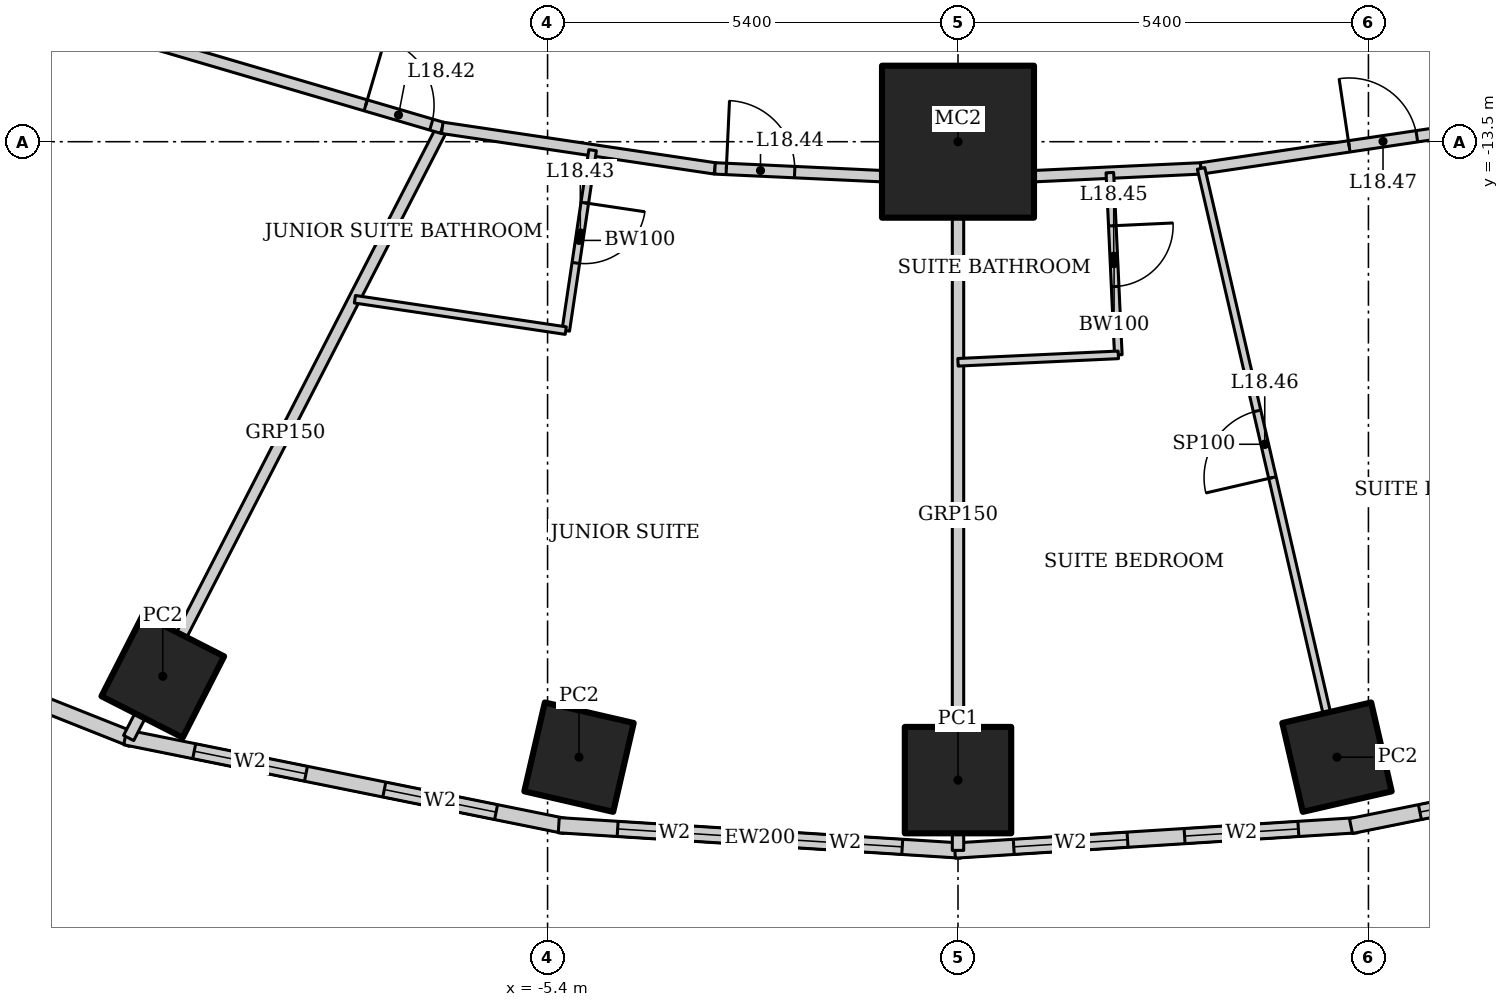
"""IFC4 building model, lengths in metres.
Left out: names, types, materials, properties, quantities, classifications, styles, units other than length and angle.
Written with IfcOpenShell. Run it as: python <this file> out.ifc"""

import sys

from ifc_helpers import new_model, si_unit, direction, frame, frame_2d, origin, origin_2d, place, context, subcontext, project, spatial, rectangle, hollow_rectangle, extrude, element, fill, save


model = new_model("IFC4")
c1 = context("Model", 3, precision=1e-05, world=origin(), true_north=direction((0.0, 1.0)))
c2 = subcontext(c1, "Body", "Model", "MODEL_VIEW")
j1 = project(units=[si_unit("LENGTHUNIT", "METRE"), si_unit("PLANEANGLEUNIT", "RADIAN")], contexts=[c1])
p1 = place(None, origin())
s1 = spatial("IfcSite", under=j1, at=p1, CompositionType="ELEMENT")
p2 = place(p1, origin())
s2 = spatial("IfcBuilding", under=s1, at=p2, CompositionType="ELEMENT")
p3 = place(p2, frame((0.0, 0.0, 80.2)))
s3 = spatial("IfcBuildingStorey", under=s2, at=p3, CompositionType="ELEMENT", Elevation=80.2)
p4 = place(p3, frame((0.0, -13.5, 0.0), z_axis=(0.0, 0.0, 1.0), x_axis=(1.0, 0.0, 0.0)))
e1 = element("IfcColumn", 1, at=p4, inside=s3, PredefinedType="COLUMN", context=c2, shape_type="SweptSolid", body=[
    extrude(hollow_rectangle(XDim=2.0, YDim=2.0, WallThickness=0.17, at=origin_2d()), origin(), (0.0, 0.0, 1.0), 3.6),
])
for number, where, z_axis, x_axis in (
    (2, (-10.463, -20.534, 0.0), (0.0, 0.0, 1.0), (0.454, 0.891, 0.0)),
    (3, (-4.986, -21.598, 0.0), (0.0, 0.0, 1.0), (0.225, 0.974, 0.0)),
):
    element("IfcColumn", number, at=place(p3, frame(where, z_axis=z_axis, x_axis=x_axis)), inside=s3, PredefinedType="COLUMN", context=c2, shape_type="SweptSolid", body=[
        extrude(hollow_rectangle(XDim=1.2, YDim=1.2, WallThickness=0.1, at=origin_2d()), origin(), (0.0, 0.0, 1.0), 3.6),
    ])
p5 = place(p3, frame((0.0, -21.9, 0.0), z_axis=(0.0, 0.0, 1.0), x_axis=(1.0, 0.0, 0.0)))
e4 = element("IfcColumn", 4, at=p5, inside=s3, PredefinedType="COLUMN", context=c2, shape_type="SweptSolid", body=[
    extrude(hollow_rectangle(XDim=1.4, YDim=1.4, WallThickness=0.1, at=origin_2d()), origin(), (0.0, 0.0, 1.0), 3.6),
])
p6 = place(p3, frame((4.986, -21.598, 0.0), z_axis=(0.0, 0.0, 1.0), x_axis=(0.974370064785, 0.224951054344, 0.0)))
e5 = element("IfcColumn", 5, at=p6, inside=s3, PredefinedType="COLUMN", context=c2, shape_type="SweptSolid", body=[
    extrude(hollow_rectangle(XDim=1.2, YDim=1.2, WallThickness=0.1, at=origin_2d()), origin(), (0.0, 0.0, 1.0), 3.6),
])
p7 = place(p3, frame((-18.018, -18.523, 0.0), z_axis=(0.0, 0.0, 1.0), x_axis=(0.929358351251, -0.369178892895, 0.0)))
e6 = element("IfcWall", 6, at=p7, inside=s3, PredefinedType="SOLIDWALL", context=c2, shape_type="SweptSolid", body=[
    extrude(rectangle(XDim=7.692, YDim=0.2, at=frame_2d((3.846, 0.0))), origin(), (0.0, 0.0, 1.0), 3.45),
])
p8 = place(p7, frame((1.373, 0.0, 0.5)))
e7 = element("IfcOpeningElement", 7, at=p8, cuts=e6, PredefinedType="OPENING", context=c2, shape_type="SweptSolid", body=[
    extrude(rectangle(XDim=1.5, YDim=2.2, at=frame_2d((0.75, 1.1))), frame((0.0, 0.11, 0.0), z_axis=(0.0, -1.0, 0.0), x_axis=(1.0, 0.0, 0.0)), (0.0, 0.0, 1.0), 0.22),
])
p9 = place(p7, frame((4.819, 0.0, 0.5)))
e8 = element("IfcOpeningElement", 8, at=p9, cuts=e6, PredefinedType="OPENING", context=c2, shape_type="SweptSolid", body=[
    extrude(rectangle(XDim=1.5, YDim=2.2, at=frame_2d((0.75, 1.1))), frame((0.0, 0.11, 0.0), z_axis=(0.0, -1.0, 0.0), x_axis=(1.0, 0.0, 0.0)), (0.0, 0.0, 1.0), 0.22),
])
p10 = place(p3, frame((-10.957, -21.337, 0.0), z_axis=(0.0, 0.0, 1.0), x_axis=(0.980251657452, -0.197754110105, 0.0)))
e9 = element("IfcWall", 9, at=p10, inside=s3, PredefinedType="SOLIDWALL", context=c2, shape_type="SweptSolid", body=[
    extrude(rectangle(XDim=5.904, YDim=0.2, at=frame_2d((2.952, 0.0))), origin(), (0.0, 0.0, 1.0), 3.45),
])
p11 = place(p10, frame((0.926, 0.0, 0.5)))
e10 = element("IfcOpeningElement", 10, at=p11, cuts=e9, PredefinedType="OPENING", context=c2, shape_type="SweptSolid", body=[
    extrude(rectangle(XDim=1.5, YDim=2.2, at=frame_2d((0.75, 1.1))), frame((0.0, 0.11, 0.0), z_axis=(0.0, -1.0, 0.0), x_axis=(1.0, 0.0, 0.0)), (0.0, 0.0, 1.0), 0.22),
])
p12 = place(p10, frame((3.478, 0.0, 0.5)))
e11 = element("IfcOpeningElement", 11, at=p12, cuts=e9, PredefinedType="OPENING", context=c2, shape_type="SweptSolid", body=[
    extrude(rectangle(XDim=1.5, YDim=2.2, at=frame_2d((0.75, 1.1))), frame((0.0, 0.11, 0.0), z_axis=(0.0, -1.0, 0.0), x_axis=(1.0, 0.0, 0.0)), (0.0, 0.0, 1.0), 0.22),
])
p13 = place(p3, frame((-5.253, -22.493, 0.0), z_axis=(0.0, 0.0, 1.0), x_axis=(0.998018582375, -0.062919863585, 0.0)))
e12 = element("IfcWall", 12, at=p13, inside=s3, PredefinedType="SOLIDWALL", context=c2, shape_type="SweptSolid", body=[
    extrude(rectangle(XDim=5.304, YDim=0.2, at=frame_2d((2.652, 0.0))), origin(), (0.0, 0.0, 1.0), 3.45),
])
p14 = place(p13, frame((0.776, 0.0, 0.5)))
e13 = element("IfcOpeningElement", 13, at=p14, cuts=e12, PredefinedType="OPENING", context=c2, shape_type="SweptSolid", body=[
    extrude(rectangle(XDim=1.5, YDim=2.2, at=frame_2d((0.75, 1.1))), frame((0.0, 0.11, 0.0), z_axis=(0.0, -1.0, 0.0), x_axis=(1.0, 0.0, 0.0)), (0.0, 0.0, 1.0), 0.22),
])
p15 = place(p13, frame((3.028, 0.0, 0.5)))
e14 = element("IfcOpeningElement", 14, at=p15, cuts=e12, PredefinedType="OPENING", context=c2, shape_type="SweptSolid", body=[
    extrude(rectangle(XDim=1.5, YDim=2.2, at=frame_2d((0.75, 1.1))), frame((0.0, 0.11, 0.0), z_axis=(0.0, -1.0, 0.0), x_axis=(1.0, 0.0, 0.0)), (0.0, 0.0, 1.0), 0.22),
])
p16 = place(p3, frame((-0.041, -22.827, 0.0), z_axis=(0.0, 0.0, 1.0), x_axis=(0.998018582375, 0.062919863585, 0.0)))
e15 = element("IfcWall", 15, at=p16, inside=s3, PredefinedType="SOLIDWALL", context=c2, shape_type="SweptSolid", body=[
    extrude(rectangle(XDim=5.304, YDim=0.2, at=frame_2d((2.652, 0.0))), origin(), (0.0, 0.0, 1.0), 3.45),
])
p17 = place(p16, frame((0.776, 0.0, 0.5)))
e16 = element("IfcOpeningElement", 16, at=p17, cuts=e15, PredefinedType="OPENING", context=c2, shape_type="SweptSolid", body=[
    extrude(rectangle(XDim=1.5, YDim=2.2, at=frame_2d((0.75, 1.1))), frame((0.0, 0.11, 0.0), z_axis=(0.0, -1.0, 0.0), x_axis=(1.0, 0.0, 0.0)), (0.0, 0.0, 1.0), 0.22),
])
p18 = place(p16, frame((3.028, 0.0, 0.5)))
e17 = element("IfcOpeningElement", 17, at=p18, cuts=e15, PredefinedType="OPENING", context=c2, shape_type="SweptSolid", body=[
    extrude(rectangle(XDim=1.5, YDim=2.2, at=frame_2d((0.75, 1.1))), frame((0.0, 0.11, 0.0), z_axis=(0.0, -1.0, 0.0), x_axis=(1.0, 0.0, 0.0)), (0.0, 0.0, 1.0), 0.22),
])
p19 = place(p3, frame((5.17, -22.504, 0.0), z_axis=(0.0, 0.0, 1.0), x_axis=(0.980251657452, 0.197754110105, 0.0)))
e18 = element("IfcWall", 18, at=p19, inside=s3, PredefinedType="SOLIDWALL", context=c2, shape_type="SweptSolid", body=[
    extrude(rectangle(XDim=5.904, YDim=0.2, at=frame_2d((2.952, 0.0))), origin(), (0.0, 0.0, 1.0), 3.45),
])
p20 = place(p19, frame((0.926, 0.0, 0.5)))
e19 = element("IfcOpeningElement", 19, at=p20, cuts=e18, PredefinedType="OPENING", context=c2, shape_type="SweptSolid", body=[
    extrude(rectangle(XDim=1.5, YDim=2.2, at=frame_2d((0.75, 1.1))), frame((0.0, 0.11, 0.0), z_axis=(0.0, -1.0, 0.0), x_axis=(1.0, 0.0, 0.0)), (0.0, 0.0, 1.0), 0.22),
])
p21 = place(p19, frame((3.478, 0.0, 0.5)))
e20 = element("IfcOpeningElement", 20, at=p21, cuts=e18, PredefinedType="OPENING", context=c2, shape_type="SweptSolid", body=[
    extrude(rectangle(XDim=1.5, YDim=2.2, at=frame_2d((0.75, 1.1))), frame((0.0, 0.11, 0.0), z_axis=(0.0, -1.0, 0.0), x_axis=(1.0, 0.0, 0.0)), (0.0, 0.0, 1.0), 0.22),
])
p22 = place(p3, frame((-10.912, -21.346, 0.0), z_axis=(0.0, 0.0, 1.0), x_axis=(0.457117602022, 0.889406261458, 0.0)))
e21 = element("IfcWall", 21, at=p22, inside=s3, PredefinedType="PARTITIONING", context=c2, shape_type="SweptSolid", body=[
    extrude(rectangle(XDim=9.027, YDim=0.15, at=frame_2d((4.513, 0.0))), origin(), (0.0, 0.0, 1.0), 2.528),
])
p23 = place(p3, frame((0.0, -22.825, 0.0), z_axis=(0.0, 0.0, 1.0), x_axis=(0.0, 1.0, 0.0)))
e22 = element("IfcWall", 22, at=p23, inside=s3, PredefinedType="PARTITIONING", context=c2, shape_type="SweptSolid", body=[
    extrude(rectangle(XDim=8.825, YDim=0.15, at=frame_2d((4.412, 0.0))), origin(), (0.0, 0.0, 1.0), 2.924),
])
p24 = place(p3, frame((-11.519, -11.928, 0.0), z_axis=(0.0, 0.0, 1.0), x_axis=(0.959496227294, -0.281721475589, 0.0)))
e23 = element("IfcWall", 23, at=p24, inside=s3, PredefinedType="PARTITIONING", context=c2, shape_type="SweptSolid", body=[
    extrude(rectangle(XDim=4.933, YDim=0.15, at=frame_2d((2.466, 0.0))), origin(), (0.0, 0.0, 1.0), 3.45),
])
p25 = place(p24, frame((3.883, 0.0, 0.0)))
e24 = element("IfcOpeningElement", 24, at=p25, cuts=e23, PredefinedType="OPENING", context=c2, shape_type="SweptSolid", body=[
    extrude(rectangle(XDim=0.9, YDim=2.1, at=frame_2d((0.45, 1.05))), frame((0.0, 0.085, 0.0), z_axis=(0.0, -1.0, 0.0), x_axis=(1.0, 0.0, 0.0)), (0.0, 0.0, 1.0), 0.17),
])
p26 = place(p3, frame((-6.786, -13.317, 0.0), z_axis=(0.0, 0.0, 1.0), x_axis=(0.989107488999, -0.14719502439, 0.0)))
e25 = element("IfcWall", 25, at=p26, inside=s3, PredefinedType="PARTITIONING", context=c2, shape_type="SweptSolid", body=[
    extrude(rectangle(XDim=3.627, YDim=0.15, at=frame_2d((1.814, 0.0))), origin(), (0.0, 0.0, 1.0), 3.45),
])
p27 = place(p3, frame((-3.198, -13.851, 0.0), z_axis=(0.0, 0.0, 1.0), x_axis=(0.998920826789, -0.046445471333, 0.0)))
e26 = element("IfcWall", 26, at=p27, inside=s3, PredefinedType="PARTITIONING", context=c2, shape_type="SweptSolid", body=[
    extrude(rectangle(XDim=3.201, YDim=0.15, at=frame_2d((1.601, 0.0))), origin(), (0.0, 0.0, 1.0), 3.45),
])
p28 = place(p27, frame((0.15, 0.0, 0.0)))
e27 = element("IfcOpeningElement", 27, at=p28, cuts=e26, PredefinedType="OPENING", context=c2, shape_type="SweptSolid", body=[
    extrude(rectangle(XDim=0.9, YDim=2.1, at=frame_2d((0.45, 1.05))), frame((0.0, 0.085, 0.0), z_axis=(0.0, -1.0, 0.0), x_axis=(1.0, 0.0, 0.0)), (0.0, 0.0, 1.0), 0.17),
])
p29 = place(p3, frame((0.0, -14.0, 0.0), z_axis=(0.0, 0.0, 1.0), x_axis=(0.998920826789, 0.046445471333, 0.0)))
e28 = element("IfcWall", 28, at=p29, inside=s3, PredefinedType="PARTITIONING", context=c2, shape_type="SweptSolid", body=[
    extrude(rectangle(XDim=3.201, YDim=0.15, at=frame_2d((1.601, 0.0))), origin(), (0.0, 0.0, 1.0), 3.45),
])
p30 = place(p3, frame((3.198, -13.851, 0.0), z_axis=(0.0, 0.0, 1.0), x_axis=(0.989107488999, 0.14719502439, 0.0)))
e29 = element("IfcWall", 29, at=p30, inside=s3, PredefinedType="PARTITIONING", context=c2, shape_type="SweptSolid", body=[
    extrude(rectangle(XDim=3.627, YDim=0.15, at=frame_2d((1.814, 0.0))), origin(), (0.0, 0.0, 1.0), 3.45),
])
p31 = place(p30, frame((1.97, 0.0, 0.0)))
e30 = element("IfcOpeningElement", 30, at=p31, cuts=e29, PredefinedType="OPENING", context=c2, shape_type="SweptSolid", body=[
    extrude(rectangle(XDim=0.9, YDim=2.1, at=frame_2d((0.45, 1.05))), frame((0.0, 0.085, 0.0), z_axis=(0.0, -1.0, 0.0), x_axis=(1.0, 0.0, 0.0)), (0.0, 0.0, 1.0), 0.17),
])
p32 = place(p3, frame((-4.807, -13.612, 0.0), z_axis=(0.0, 0.0, 1.0), x_axis=(-0.147201193874, -0.989106570862, 0.0)))
e31 = element("IfcWall", 31, at=p32, inside=s3, PredefinedType="PARTITIONING", context=c2, shape_type="SweptSolid", body=[
    extrude(rectangle(XDim=2.4, YDim=0.1, at=frame_2d((1.2, 0.0))), origin(), (0.0, 0.0, 1.0), 3.45),
])
p33 = place(p32, frame((0.7, 0.0, 0.0)))
e32 = element("IfcOpeningElement", 32, at=p33, cuts=e31, PredefinedType="OPENING", context=c2, shape_type="SweptSolid", body=[
    extrude(rectangle(XDim=0.8, YDim=2.1, at=frame_2d((0.4, 1.05))), frame((0.0, 0.06, 0.0), z_axis=(0.0, -1.0, 0.0), x_axis=(1.0, 0.0, 0.0)), (0.0, 0.0, 1.0), 0.12),
])
p34 = place(p3, frame((-5.161, -15.986, 0.0), z_axis=(0.0, 0.0, 1.0), x_axis=(-0.98910744157, 0.147195343104, 0.0)))
e33 = element("IfcWall", 33, at=p34, inside=s3, PredefinedType="PARTITIONING", context=c2, shape_type="SweptSolid", body=[
    extrude(rectangle(XDim=2.805, YDim=0.1, at=frame_2d((1.402, 0.0))), origin(), (0.0, 0.0, 1.0), 3.45),
])
p35 = place(p3, frame((1.998, -13.907, 0.0), z_axis=(0.0, 0.0, 1.0), x_axis=(0.046492089498, -0.998918658157, 0.0)))
e34 = element("IfcWall", 34, at=p35, inside=s3, PredefinedType="PARTITIONING", context=c2, shape_type="SweptSolid", body=[
    extrude(rectangle(XDim=2.4, YDim=0.1, at=frame_2d((1.2, 0.0))), origin(), (0.0, 0.0, 1.0), 2.749),
])
p36 = place(p35, frame((0.7, 0.0, 0.0)))
e35 = element("IfcOpeningElement", 35, at=p36, cuts=e34, PredefinedType="OPENING", context=c2, shape_type="SweptSolid", body=[
    extrude(rectangle(XDim=0.8, YDim=2.1, at=frame_2d((0.4, 1.05))), frame((0.0, 0.06, 0.0), z_axis=(0.0, -1.0, 0.0), x_axis=(1.0, 0.0, 0.0)), (0.0, 0.0, 1.0), 0.12),
])
p37 = place(p3, frame((2.109, -16.304, 0.0), z_axis=(0.0, 0.0, 1.0), x_axis=(-0.998919337223, -0.04647749694, 0.0)))
e36 = element("IfcWall", 36, at=p37, inside=s3, PredefinedType="PARTITIONING", context=c2, shape_type="SweptSolid", body=[
    extrude(rectangle(XDim=2.112, YDim=0.1, at=frame_2d((1.056, 0.0))), origin(), (0.0, 0.0, 1.0), 3.45),
])
p38 = place(p3, frame((4.874, -21.111, 0.0), z_axis=(0.0, 0.0, 1.0), x_axis=(-0.224955233595, 0.97436909992, 0.0)))
e37 = element("IfcWall", 37, at=p38, inside=s3, PredefinedType="PARTITIONING", context=c2, shape_type="SweptSolid", body=[
    extrude(rectangle(XDim=7.45, YDim=0.1, at=frame_2d((3.725, 0.0))), origin(), (0.0, 0.0, 1.0), 2.767),
])
p39 = place(p38, frame((3.275, 0.0, 0.0)))
e38 = element("IfcOpeningElement", 38, at=p39, cuts=e37, PredefinedType="OPENING", context=c2, shape_type="SweptSolid", body=[
    extrude(rectangle(XDim=0.9, YDim=2.1, at=frame_2d((0.45, 1.05))), frame((0.0, 0.06, 0.0), z_axis=(0.0, -1.0, 0.0), x_axis=(1.0, 0.0, 0.0)), (0.0, 0.0, 1.0), 0.12),
])
p40 = place(p11, origin())
e39 = element("IfcWindow", 39, at=p40, inside=s3, PartitioningType="SINGLE_PANEL", PredefinedType="WINDOW", context=c2, shape_type="SweptSolid", body=[
    extrude(rectangle(XDim=1.5, YDim=2.2, at=frame_2d((0.75, 1.1))), frame((0.0, 0.03, 0.0), z_axis=(0.0, -1.0, 0.0), x_axis=(1.0, 0.0, 0.0)), (0.0, 0.0, 1.0), 0.06),
])
fill(e10, e39)
p41 = place(p12, origin())
e40 = element("IfcWindow", 40, at=p41, inside=s3, PartitioningType="SINGLE_PANEL", PredefinedType="WINDOW", context=c2, shape_type="SweptSolid", body=[
    extrude(rectangle(XDim=1.5, YDim=2.2, at=frame_2d((0.75, 1.1))), frame((0.0, 0.03, 0.0), z_axis=(0.0, -1.0, 0.0), x_axis=(1.0, 0.0, 0.0)), (0.0, 0.0, 1.0), 0.06),
])
fill(e11, e40)
p42 = place(p14, origin())
e41 = element("IfcWindow", 41, at=p42, inside=s3, PartitioningType="SINGLE_PANEL", PredefinedType="WINDOW", context=c2, shape_type="SweptSolid", body=[
    extrude(rectangle(XDim=1.5, YDim=2.2, at=frame_2d((0.75, 1.1))), frame((0.0, 0.03, 0.0), z_axis=(0.0, -1.0, 0.0), x_axis=(1.0, 0.0, 0.0)), (0.0, 0.0, 1.0), 0.06),
])
fill(e13, e41)
p43 = place(p15, origin())
e42 = element("IfcWindow", 42, at=p43, inside=s3, PartitioningType="SINGLE_PANEL", PredefinedType="WINDOW", context=c2, shape_type="SweptSolid", body=[
    extrude(rectangle(XDim=1.5, YDim=2.2, at=frame_2d((0.75, 1.1))), frame((0.0, 0.03, 0.0), z_axis=(0.0, -1.0, 0.0), x_axis=(1.0, 0.0, 0.0)), (0.0, 0.0, 1.0), 0.06),
])
fill(e14, e42)
p44 = place(p17, origin())
e43 = element("IfcWindow", 43, at=p44, inside=s3, PartitioningType="SINGLE_PANEL", PredefinedType="WINDOW", context=c2, shape_type="SweptSolid", body=[
    extrude(rectangle(XDim=1.5, YDim=2.2, at=frame_2d((0.75, 1.1))), frame((0.0, 0.03, 0.0), z_axis=(0.0, -1.0, 0.0), x_axis=(1.0, 0.0, 0.0)), (0.0, 0.0, 1.0), 0.06),
])
fill(e16, e43)
p45 = place(p18, origin())
e44 = element("IfcWindow", 44, at=p45, inside=s3, PartitioningType="SINGLE_PANEL", PredefinedType="WINDOW", context=c2, shape_type="SweptSolid", body=[
    extrude(rectangle(XDim=1.5, YDim=2.2, at=frame_2d((0.75, 1.1))), frame((0.0, 0.03, 0.0), z_axis=(0.0, -1.0, 0.0), x_axis=(1.0, 0.0, 0.0)), (0.0, 0.0, 1.0), 0.06),
])
fill(e17, e44)
p46 = place(p20, origin())
e45 = element("IfcWindow", 45, at=p46, inside=s3, PartitioningType="SINGLE_PANEL", PredefinedType="WINDOW", context=c2, shape_type="SweptSolid", body=[
    extrude(rectangle(XDim=1.5, YDim=2.2, at=frame_2d((0.75, 1.1))), frame((0.0, 0.03, 0.0), z_axis=(0.0, -1.0, 0.0), x_axis=(1.0, 0.0, 0.0)), (0.0, 0.0, 1.0), 0.06),
])
fill(e19, e45)
p47 = place(p25, origin())
e46 = element("IfcDoor", 46, at=p47, inside=s3, OperationType="SINGLE_SWING_LEFT", PredefinedType="DOOR", context=c2, shape_type="SweptSolid", body=[
    extrude(rectangle(XDim=0.9, YDim=2.1, at=frame_2d((0.45, 1.05))), frame((0.0, 0.025, 0.0), z_axis=(0.0, -1.0, 0.0), x_axis=(1.0, 0.0, 0.0)), (0.0, 0.0, 1.0), 0.05),
])
fill(e24, e46)
p48 = place(p33, origin())
e47 = element("IfcDoor", 47, at=p48, inside=s3, OperationType="SINGLE_SWING_LEFT", PredefinedType="DOOR", context=c2, shape_type="SweptSolid", body=[
    extrude(rectangle(XDim=0.8, YDim=2.1, at=frame_2d((0.4, 1.05))), frame((0.0, 0.025, 0.0), z_axis=(0.0, -1.0, 0.0), x_axis=(1.0, 0.0, 0.0)), (0.0, 0.0, 1.0), 0.05),
])
fill(e32, e47)
p49 = place(p28, origin())
e48 = element("IfcDoor", 48, at=p49, inside=s3, OperationType="SINGLE_SWING_LEFT", PredefinedType="DOOR", context=c2, shape_type="SweptSolid", body=[
    extrude(rectangle(XDim=0.9, YDim=2.1, at=frame_2d((0.45, 1.05))), frame((0.0, 0.025, 0.0), z_axis=(0.0, -1.0, 0.0), x_axis=(1.0, 0.0, 0.0)), (0.0, 0.0, 1.0), 0.05),
])
fill(e27, e48)
p50 = place(p36, origin())
e49 = element("IfcDoor", 49, at=p50, inside=s3, OperationType="SINGLE_SWING_LEFT", PredefinedType="DOOR", context=c2, shape_type="SweptSolid", body=[
    extrude(rectangle(XDim=0.8, YDim=2.1, at=frame_2d((0.4, 1.05))), frame((0.0, 0.025, 0.0), z_axis=(0.0, -1.0, 0.0), x_axis=(1.0, 0.0, 0.0)), (0.0, 0.0, 1.0), 0.05),
])
fill(e35, e49)
p51 = place(p39, origin())
e50 = element("IfcDoor", 50, at=p51, inside=s3, OperationType="SINGLE_SWING_LEFT", PredefinedType="DOOR", context=c2, shape_type="SweptSolid", body=[
    extrude(rectangle(XDim=0.9, YDim=2.1, at=frame_2d((0.45, 1.05))), frame((0.0, 0.025, 0.0), z_axis=(0.0, -1.0, 0.0), x_axis=(1.0, 0.0, 0.0)), (0.0, 0.0, 1.0), 0.05),
])
fill(e38, e50)
p52 = place(p31, origin())
e51 = element("IfcDoor", 51, at=p52, inside=s3, OperationType="SINGLE_SWING_LEFT", PredefinedType="DOOR", context=c2, shape_type="SweptSolid", body=[
    extrude(rectangle(XDim=0.9, YDim=2.1, at=frame_2d((0.45, 1.05))), frame((0.0, 0.025, 0.0), z_axis=(0.0, -1.0, 0.0), x_axis=(1.0, 0.0, 0.0)), (0.0, 0.0, 1.0), 0.05),
])
fill(e30, e51)
save(model, sys.argv[1])
